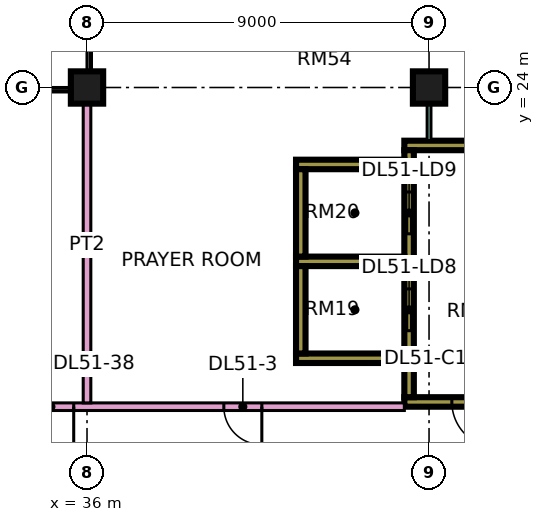
"""IFC4 building model, lengths in metres.
Left out: names, types, materials, properties, quantities, classifications, styles, units other than length and angle.
Written with IfcOpenShell. Run it as: python <this file> out.ifc"""

import sys

from ifc_helpers import new_model, si_unit, direction, frame, frame_2d, origin, origin_2d, place, context, subcontext, project, spatial, rectangle, extrude, element, fill, save


model = new_model("IFC4")
c1 = context("Model", 3, precision=1e-05, world=origin(), true_north=direction((0.0, 1.0)))
c2 = subcontext(c1, "Body", "Model", "MODEL_VIEW")
j1 = project(units=[si_unit("LENGTHUNIT", "METRE"), si_unit("PLANEANGLEUNIT", "RADIAN")], contexts=[c1])
p1 = place(None, origin())
s1 = spatial("IfcSite", under=j1, at=p1, CompositionType="ELEMENT")
p2 = place(p1, origin())
s2 = spatial("IfcBuilding", under=s1, at=p2, CompositionType="ELEMENT")
p3 = place(p2, frame((0.0, 0.0, 219.15)))
s3 = spatial("IfcBuildingStorey", under=s2, at=p3, CompositionType="ELEMENT", Elevation=219.15)
for number, where, z_axis, x_axis in (
    (1, (36.0, 24.0, 0.0), (0.0, 0.0, 1.0), (1.0, 0.0, 0.0)),
    (2, (45.0, 24.0, 0.0), (0.0, 0.0, 1.0), (1.0, 0.0, 0.0)),
):
    element("IfcColumn", number, at=place(p3, frame(where, z_axis=z_axis, x_axis=x_axis)), inside=s3, PredefinedType="COLUMN", context=c2, shape_type="SweptSolid", body=[
        extrude(rectangle(XDim=0.85, YDim=0.85, at=origin_2d()), origin(), (0.0, 0.0, 1.0), 3.75),
    ])
p4 = place(p3, frame((44.35, 15.725, 0.0), z_axis=(0.0, 0.0, 1.0), x_axis=(1.0, 0.0, 0.0)))
e3 = element("IfcWall", 3, at=p4, inside=s3, PredefinedType="SHEAR", context=c2, shape_type="SweptSolid", body=[
    extrude(rectangle(XDim=3.425, YDim=0.25, at=frame_2d((1.712, 0.0))), origin(), (0.0, 0.0, 1.0), 3.75),
])
p5 = place(p4, frame((1.25, 0.0, 0.0)))
e4 = element("IfcOpeningElement", 4, at=p5, cuts=e3, PredefinedType="OPENING", context=c2, shape_type="SweptSolid", body=[
    extrude(rectangle(XDim=1.2, YDim=2.2, at=frame_2d((0.6, 1.1))), frame((0.0, 0.135, 0.0), z_axis=(0.0, -1.0, 0.0), x_axis=(1.0, 0.0, 0.0)), (0.0, 0.0, 1.0), 0.27),
])
p6 = place(p3, frame((44.35, 22.475, 0.0), z_axis=(0.0, 0.0, 1.0), x_axis=(1.0, 0.0, 0.0)))
e5 = element("IfcWall", 5, at=p6, inside=s3, PredefinedType="SHEAR", context=c2, shape_type="SweptSolid", body=[
    extrude(rectangle(XDim=3.425, YDim=0.25, at=frame_2d((1.712, 0.0))), origin(), (0.0, 0.0, 1.0), 3.75),
])
p7 = place(p3, frame((44.475, 15.85, 0.0), z_axis=(0.0, 0.0, 1.0), x_axis=(0.0, 1.0, 0.0)))
e6 = element("IfcWall", 6, at=p7, inside=s3, PredefinedType="SHEAR", context=c2, shape_type="SweptSolid", body=[
    extrude(rectangle(XDim=6.5, YDim=0.25, at=frame_2d((3.25, 0.0))), origin(), (0.0, 0.0, 1.0), 3.75),
])
p8 = place(p7, frame((1.75, 0.0, 0.0)))
e7 = element("IfcOpeningElement", 7, at=p8, cuts=e6, PredefinedType="OPENING", context=c2, shape_type="SweptSolid", body=[
    extrude(rectangle(XDim=1.1, YDim=2.2, at=frame_2d((0.55, 1.1))), frame((0.0, 0.135, 0.0), z_axis=(0.0, -1.0, 0.0), x_axis=(1.0, 0.0, 0.0)), (0.0, 0.0, 1.0), 0.27),
])
p9 = place(p7, frame((4.3, 0.0, 0.0)))
e8 = element("IfcOpeningElement", 8, at=p9, cuts=e6, PredefinedType="OPENING", context=c2, shape_type="SweptSolid", body=[
    extrude(rectangle(XDim=1.1, YDim=2.2, at=frame_2d((0.55, 1.1))), frame((0.0, 0.135, 0.0), z_axis=(0.0, -1.0, 0.0), x_axis=(1.0, 0.0, 0.0)), (0.0, 0.0, 1.0), 0.27),
])
for number, where, z_axis, x_axis in (
    (9, (41.5, 16.875, 0.0), (0.0, 0.0, 1.0), (1.0, 0.0, 0.0)),
    (10, (41.5, 19.425, 0.0), (0.0, 0.0, 1.0), (1.0, 0.0, 0.0)),
    (11, (41.5, 21.975, 0.0), (0.0, 0.0, 1.0), (1.0, 0.0, 0.0)),
):
    element("IfcWall", number, at=place(p3, frame(where, z_axis=z_axis, x_axis=x_axis)), inside=s3, PredefinedType="SHEAR", context=c2, shape_type="SweptSolid", body=[
        extrude(rectangle(XDim=2.85, YDim=0.25, at=frame_2d((1.425, 0.0))), origin(), (0.0, 0.0, 1.0), 3.75),
    ])
for number, where, z_axis, x_axis in (
    (12, (41.625, 17.0, 0.0), (0.0, 0.0, 1.0), (0.0, 1.0, 0.0)),
    (13, (41.625, 19.55, 0.0), (0.0, 0.0, 1.0), (0.0, 1.0, 0.0)),
):
    element("IfcWall", number, at=place(p3, frame(where, z_axis=z_axis, x_axis=x_axis)), inside=s3, PredefinedType="SHEAR", context=c2, shape_type="SweptSolid", body=[
        extrude(rectangle(XDim=2.3, YDim=0.25, at=frame_2d((1.15, 0.0))), origin(), (0.0, 0.0, 1.0), 3.75),
    ])
p10 = place(p3, frame((34.0, 15.6, 0.0), z_axis=(0.0, 0.0, 1.0), x_axis=(1.0, 0.0, 0.0)))
e14 = element("IfcWall", 14, at=p10, inside=s3, PredefinedType="PARTITIONING", context=c2, shape_type="SweptSolid", body=[
    extrude(rectangle(XDim=10.35, YDim=0.2, at=frame_2d((5.175, 0.0))), origin(), (0.0, 0.0, 1.0), 3.35),
])
p11 = place(p10, frame((5.6, 0.0, 0.0)))
e15 = element("IfcOpeningElement", 15, at=p11, cuts=e14, PredefinedType="OPENING", context=c2, shape_type="SweptSolid", body=[
    extrude(rectangle(XDim=1.0, YDim=2.1, at=frame_2d((0.5, 1.05))), frame((0.0, 0.11, 0.0), z_axis=(0.0, -1.0, 0.0), x_axis=(1.0, 0.0, 0.0)), (0.0, 0.0, 1.0), 0.22),
])
p12 = place(p10, frame((0.45, 0.0, 0.0)))
e16 = element("IfcOpeningElement", 16, at=p12, cuts=e14, PredefinedType="OPENING", context=c2, shape_type="SweptSolid", body=[
    extrude(rectangle(XDim=1.2, YDim=2.1, at=frame_2d((0.6, 1.05))), frame((0.0, 0.11, 0.0), z_axis=(0.0, -1.0, 0.0), x_axis=(1.0, 0.0, 0.0)), (0.0, 0.0, 1.0), 0.22),
])
p13 = place(p3, frame((36.0, 15.7, 0.0), z_axis=(0.0, 0.0, 1.0), x_axis=(0.0, 1.0, 0.0)))
e17 = element("IfcWall", 17, at=p13, inside=s3, PredefinedType="PARTITIONING", context=c2, shape_type="SweptSolid", body=[
    extrude(rectangle(XDim=8.3, YDim=0.2, at=frame_2d((4.15, 0.0))), origin(), (0.0, 0.0, 1.0), 3.35),
])
p14 = place(p3, frame((45.0, 22.6, 0.0), z_axis=(0.0, 0.0, 1.0), x_axis=(0.0, 1.0, 0.0)))
e18 = element("IfcWall", 18, at=p14, inside=s3, PredefinedType="PARTITIONING", context=c2, shape_type="SweptSolid", body=[
    extrude(rectangle(XDim=1.4, YDim=0.1, at=frame_2d((0.7, 0.0))), origin(), (0.0, 0.0, 1.0), 3.35),
])
p15 = place(p5, origin())
e19 = element("IfcDoor", 19, at=p15, inside=s3, OperationType="SINGLE_SWING_RIGHT", PredefinedType="DOOR", context=c2, shape_type="SweptSolid", body=[
    extrude(rectangle(XDim=1.2, YDim=2.2, at=frame_2d((0.6, 1.1))), frame((0.0, 0.025, 0.0), z_axis=(0.0, -1.0, 0.0), x_axis=(1.0, 0.0, 0.0)), (0.0, 0.0, 1.0), 0.05),
])
fill(e4, e19)
p16 = place(p8, origin())
e20 = element("IfcDoor", 20, at=p16, inside=s3, OperationType="DOUBLE_DOOR_SLIDING", PredefinedType="DOOR", context=c2, shape_type="SweptSolid", body=[
    extrude(rectangle(XDim=1.1, YDim=2.2, at=frame_2d((0.55, 1.1))), frame((0.0, 0.025, 0.0), z_axis=(0.0, -1.0, 0.0), x_axis=(1.0, 0.0, 0.0)), (0.0, 0.0, 1.0), 0.05),
])
fill(e7, e20)
p17 = place(p9, origin())
e21 = element("IfcDoor", 21, at=p17, inside=s3, OperationType="DOUBLE_DOOR_SLIDING", PredefinedType="DOOR", context=c2, shape_type="SweptSolid", body=[
    extrude(rectangle(XDim=1.1, YDim=2.2, at=frame_2d((0.55, 1.1))), frame((0.0, 0.025, 0.0), z_axis=(0.0, -1.0, 0.0), x_axis=(1.0, 0.0, 0.0)), (0.0, 0.0, 1.0), 0.05),
])
fill(e8, e21)
p18 = place(p11, origin())
e22 = element("IfcDoor", 22, at=p18, inside=s3, OperationType="SINGLE_SWING_RIGHT", PredefinedType="DOOR", context=c2, shape_type="SweptSolid", body=[
    extrude(rectangle(XDim=1.0, YDim=2.1, at=frame_2d((0.5, 1.05))), frame((0.0, 0.025, 0.0), z_axis=(0.0, -1.0, 0.0), x_axis=(1.0, 0.0, 0.0)), (0.0, 0.0, 1.0), 0.05),
])
fill(e15, e22)
p19 = place(p12, origin())
e23 = element("IfcDoor", 23, at=p19, inside=s3, OperationType="SINGLE_SWING_RIGHT", PredefinedType="DOOR", context=c2, shape_type="SweptSolid", body=[
    extrude(rectangle(XDim=1.2, YDim=2.1, at=frame_2d((0.6, 1.05))), frame((0.0, 0.025, 0.0), z_axis=(0.0, -1.0, 0.0), x_axis=(1.0, 0.0, 0.0)), (0.0, 0.0, 1.0), 0.05),
])
fill(e16, e23)
save(model, sys.argv[1])
